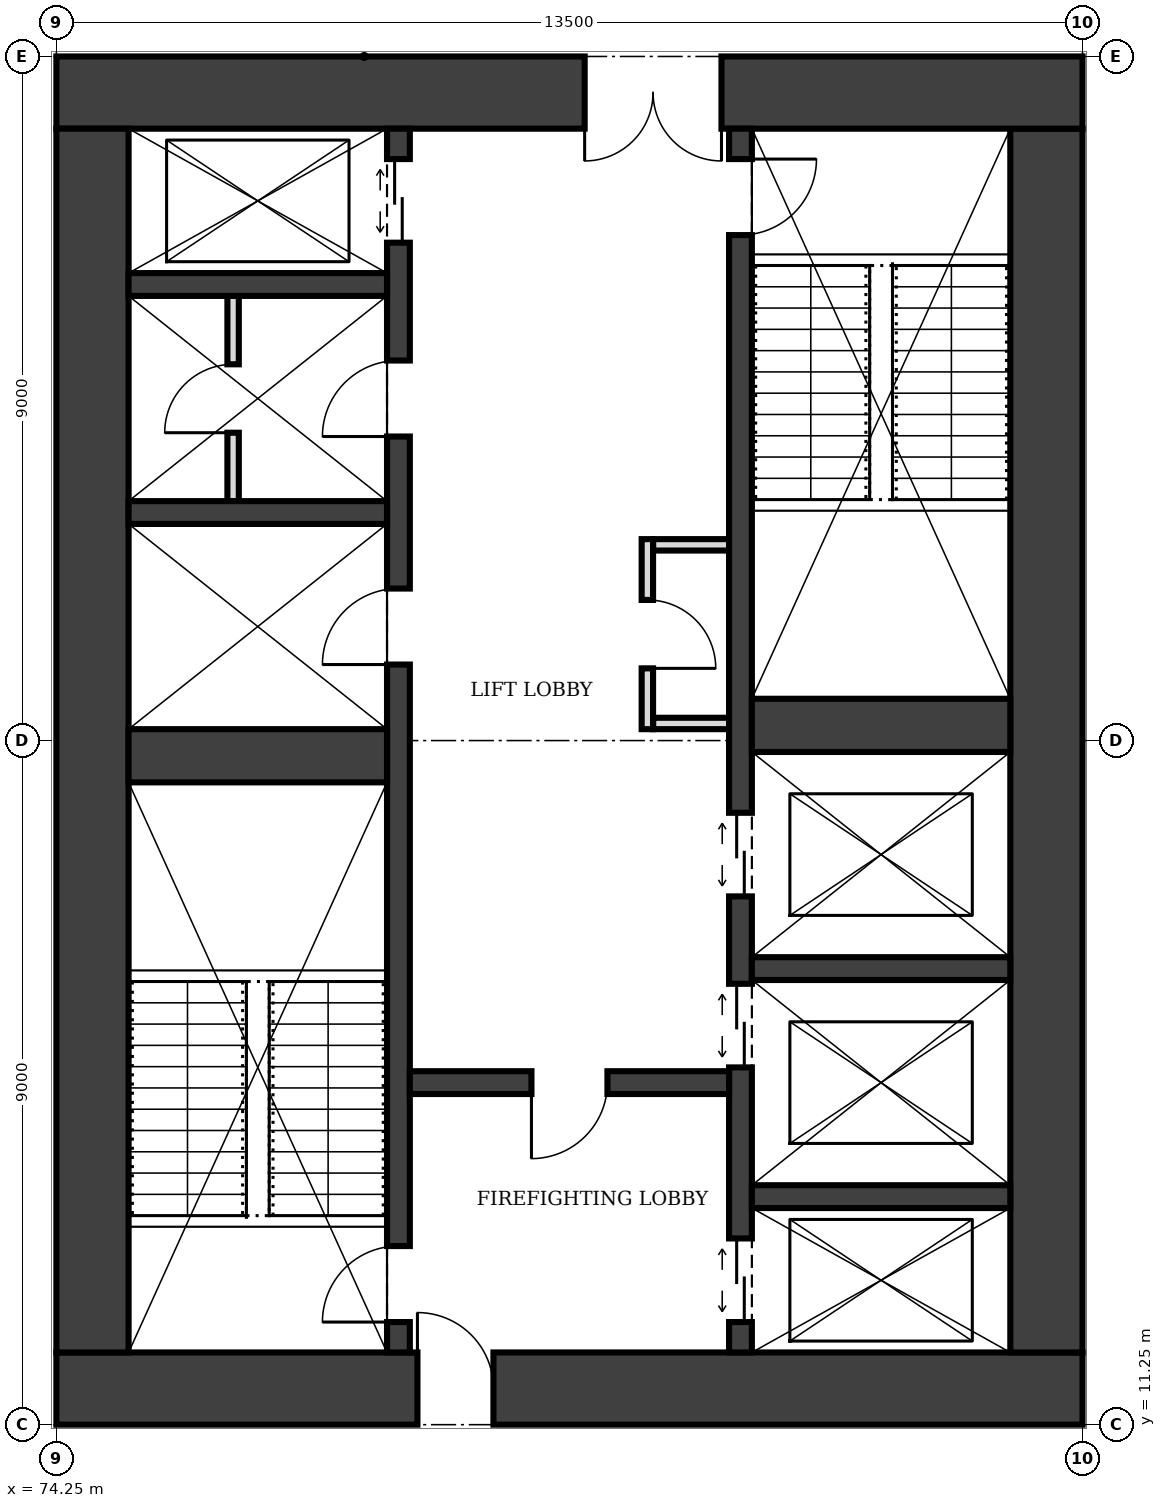
"""IFC4 building model, lengths in metres.
Left out: names, types, materials, properties, quantities, classifications, styles, units other than length and angle.
Written with IfcOpenShell. Run it as: python <this file> out.ifc"""

import sys

from ifc_helpers import new_model, si_unit, direction, frame, frame_2d, origin, place, context, subcontext, project, spatial, rectangle, extrude, element, fill, save


model = new_model("IFC4")
c1 = context("Model", 3, precision=1e-05, world=origin(), true_north=direction((0.0, 1.0)))
c2 = subcontext(c1, "Body", "Model", "MODEL_VIEW")
j1 = project(units=[si_unit("LENGTHUNIT", "METRE"), si_unit("PLANEANGLEUNIT", "RADIAN")], contexts=[c1])
p1 = place(None, origin())
s1 = spatial("IfcSite", under=j1, at=p1, CompositionType="ELEMENT")
p2 = place(p1, origin())
s2 = spatial("IfcBuilding", under=s1, at=p2, CompositionType="ELEMENT")
p3 = place(p2, frame((0.0, 0.0, 221.0)))
s3 = spatial("IfcBuildingStorey", under=s2, at=p3, CompositionType="ELEMENT", Elevation=221.0)
p4 = place(p3, frame((74.25, 11.725, 0.0), z_axis=(0.0, 0.0, 1.0), x_axis=(1.0, 0.0, 0.0)))
e1 = element("IfcWall", 1, at=p4, inside=s3, PredefinedType="SHEAR", context=c2, shape_type="SweptSolid", body=[
    extrude(rectangle(XDim=13.5, YDim=0.95, at=frame_2d((6.75, 0.0))), origin(), (0.0, 0.0, 1.0), 4.0),
])
p5 = place(p4, frame((4.75, 0.0, 0.0)))
e2 = element("IfcOpeningElement", 2, at=p5, cuts=e1, PredefinedType="OPENING", context=c2, shape_type="SweptSolid", body=[
    extrude(rectangle(XDim=1.0, YDim=2.1, at=frame_2d((0.5, 1.05))), frame((0.0, 0.485, 0.0), z_axis=(0.0, -1.0, 0.0), x_axis=(1.0, 0.0, 0.0)), (0.0, 0.0, 1.0), 0.97),
])
p6 = place(p3, frame((87.275, 12.2, 0.0), z_axis=(0.0, 0.0, 1.0), x_axis=(0.0, 1.0, 0.0)))
e3 = element("IfcWall", 3, at=p6, inside=s3, PredefinedType="SHEAR", context=c2, shape_type="SweptSolid", body=[
    extrude(rectangle(XDim=16.1, YDim=0.95, at=frame_2d((8.05, 0.0))), origin(), (0.0, 0.0, 1.0), 4.0),
])
p7 = place(p3, frame((87.75, 28.775, 0.0), z_axis=(0.0, 0.0, 1.0), x_axis=(-1.0, 0.0, 0.0)))
e4 = element("IfcWall", 4, at=p7, inside=s3, PredefinedType="SHEAR", context=c2, shape_type="SweptSolid", body=[
    extrude(rectangle(XDim=13.5, YDim=0.95, at=frame_2d((6.75, 0.0))), origin(), (0.0, 0.0, 1.0), 4.0),
])
p8 = place(p7, frame((4.75, 0.0, 0.0)))
e5 = element("IfcOpeningElement", 5, at=p8, cuts=e4, PredefinedType="OPENING", context=c2, shape_type="SweptSolid", body=[
    extrude(rectangle(XDim=1.8, YDim=2.1, at=frame_2d((0.9, 1.05))), frame((0.0, 0.485, 0.0), z_axis=(0.0, -1.0, 0.0), x_axis=(1.0, 0.0, 0.0)), (0.0, 0.0, 1.0), 0.97),
])
p9 = place(p3, frame((74.725, 28.3, 0.0), z_axis=(0.0, 0.0, 1.0), x_axis=(0.0, -1.0, 0.0)))
e6 = element("IfcWall", 6, at=p9, inside=s3, PredefinedType="SHEAR", context=c2, shape_type="SweptSolid", body=[
    extrude(rectangle(XDim=16.1, YDim=0.95, at=frame_2d((8.05, 0.0))), origin(), (0.0, 0.0, 1.0), 4.0),
])
p10 = place(p3, frame((78.75, 12.2, 0.0), z_axis=(0.0, 0.0, 1.0), x_axis=(0.0, 1.0, 0.0)))
e7 = element("IfcWall", 7, at=p10, inside=s3, PredefinedType="SHEAR", context=c2, shape_type="SweptSolid", body=[
    extrude(rectangle(XDim=16.1, YDim=0.3, at=frame_2d((8.05, 0.0))), origin(), (0.0, 0.0, 1.0), 4.0),
])
p11 = place(p10, frame((0.4, 0.0, 0.0)))
e8 = element("IfcOpeningElement", 8, at=p11, cuts=e7, PredefinedType="OPENING", context=c2, shape_type="SweptSolid", body=[
    extrude(rectangle(XDim=1.0, YDim=2.1, at=frame_2d((0.5, 1.05))), frame((0.0, 0.16, 0.0), z_axis=(0.0, -1.0, 0.0), x_axis=(1.0, 0.0, 0.0)), (0.0, 0.0, 1.0), 0.32),
])
p12 = place(p10, frame((14.6, 0.0, 0.0)))
e9 = element("IfcOpeningElement", 9, at=p12, cuts=e7, PredefinedType="OPENING", context=c2, shape_type="SweptSolid", body=[
    extrude(rectangle(XDim=1.1, YDim=2.1, at=frame_2d((0.55, 1.05))), frame((0.0, 0.16, 0.0), z_axis=(0.0, -1.0, 0.0), x_axis=(1.0, 0.0, 0.0)), (0.0, 0.0, 1.0), 0.32),
])
p13 = place(p10, frame((9.05, 0.0, 0.0)))
e10 = element("IfcOpeningElement", 10, at=p13, cuts=e7, PredefinedType="OPENING", context=c2, shape_type="SweptSolid", body=[
    extrude(rectangle(XDim=1.0, YDim=2.1, at=frame_2d((0.5, 1.05))), frame((0.0, 0.16, 0.0), z_axis=(0.0, -1.0, 0.0), x_axis=(1.0, 0.0, 0.0)), (0.0, 0.0, 1.0), 0.32),
])
p14 = place(p10, frame((12.05, 0.0, 0.0)))
e11 = element("IfcOpeningElement", 11, at=p14, cuts=e7, PredefinedType="OPENING", context=c2, shape_type="SweptSolid", body=[
    extrude(rectangle(XDim=1.0, YDim=2.1, at=frame_2d((0.5, 1.05))), frame((0.0, 0.16, 0.0), z_axis=(0.0, -1.0, 0.0), x_axis=(1.0, 0.0, 0.0)), (0.0, 0.0, 1.0), 0.32),
])
p15 = place(p3, frame((83.25, 12.2, 0.0), z_axis=(0.0, 0.0, 1.0), x_axis=(0.0, 1.0, 0.0)))
e12 = element("IfcWall", 12, at=p15, inside=s3, PredefinedType="SHEAR", context=c2, shape_type="SweptSolid", body=[
    extrude(rectangle(XDim=16.1, YDim=0.3, at=frame_2d((8.05, 0.0))), origin(), (0.0, 0.0, 1.0), 4.0),
])
p16 = place(p15, frame((14.7, 0.0, 0.0)))
e13 = element("IfcOpeningElement", 13, at=p16, cuts=e12, PredefinedType="OPENING", context=c2, shape_type="SweptSolid", body=[
    extrude(rectangle(XDim=1.0, YDim=2.1, at=frame_2d((0.5, 1.05))), frame((0.0, 0.16, 0.0), z_axis=(0.0, -1.0, 0.0), x_axis=(1.0, 0.0, 0.0)), (0.0, 0.0, 1.0), 0.32),
])
p17 = place(p15, frame((0.4, 0.0, 0.0)))
e14 = element("IfcOpeningElement", 14, at=p17, cuts=e12, PredefinedType="OPENING", context=c2, shape_type="SweptSolid", body=[
    extrude(rectangle(XDim=1.1, YDim=2.1, at=frame_2d((0.55, 1.05))), frame((0.0, 0.16, 0.0), z_axis=(0.0, -1.0, 0.0), x_axis=(1.0, 0.0, 0.0)), (0.0, 0.0, 1.0), 0.32),
])
p18 = place(p15, frame((3.75, 0.0, 0.0)))
e15 = element("IfcOpeningElement", 15, at=p18, cuts=e12, PredefinedType="OPENING", context=c2, shape_type="SweptSolid", body=[
    extrude(rectangle(XDim=1.1, YDim=2.1, at=frame_2d((0.55, 1.05))), frame((0.0, 0.16, 0.0), z_axis=(0.0, -1.0, 0.0), x_axis=(1.0, 0.0, 0.0)), (0.0, 0.0, 1.0), 0.32),
])
p19 = place(p15, frame((6.0, 0.0, 0.0)))
e16 = element("IfcOpeningElement", 16, at=p19, cuts=e12, PredefinedType="OPENING", context=c2, shape_type="SweptSolid", body=[
    extrude(rectangle(XDim=1.1, YDim=2.1, at=frame_2d((0.55, 1.05))), frame((0.0, 0.16, 0.0), z_axis=(0.0, -1.0, 0.0), x_axis=(1.0, 0.0, 0.0)), (0.0, 0.0, 1.0), 0.32),
])
p20 = place(p3, frame((75.2, 20.05, 0.0), z_axis=(0.0, 0.0, 1.0), x_axis=(1.0, 0.0, 0.0)))
e17 = element("IfcWall", 17, at=p20, inside=s3, PredefinedType="SHEAR", context=c2, shape_type="SweptSolid", body=[
    extrude(rectangle(XDim=3.4, YDim=0.7, at=frame_2d((1.7, 0.0))), origin(), (0.0, 0.0, 1.0), 4.0),
])
p21 = place(p3, frame((78.9, 15.75, 0.0), z_axis=(0.0, 0.0, 1.0), x_axis=(1.0, 0.0, 0.0)))
e18 = element("IfcWall", 18, at=p21, inside=s3, PredefinedType="SHEAR", context=c2, shape_type="SweptSolid", body=[
    extrude(rectangle(XDim=4.2, YDim=0.3, at=frame_2d((2.1, 0.0))), origin(), (0.0, 0.0, 1.0), 4.0),
])
p22 = place(p21, frame((1.6, 0.0, 0.0)))
e19 = element("IfcOpeningElement", 19, at=p22, cuts=e18, PredefinedType="OPENING", context=c2, shape_type="SweptSolid", body=[
    extrude(rectangle(XDim=1.0, YDim=2.1, at=frame_2d((0.5, 1.05))), frame((0.0, 0.16, 0.0), z_axis=(0.0, -1.0, 0.0), x_axis=(1.0, 0.0, 0.0)), (0.0, 0.0, 1.0), 0.32),
])
for number, where, z_axis, x_axis in (
    (20, (83.4, 14.25, 0.0), (0.0, 0.0, 1.0), (1.0, 0.0, 0.0)),
    (21, (83.4, 17.25, 0.0), (0.0, 0.0, 1.0), (1.0, 0.0, 0.0)),
):
    element("IfcWall", number, at=place(p3, frame(where, z_axis=z_axis, x_axis=x_axis)), inside=s3, PredefinedType="SHEAR", context=c2, shape_type="SweptSolid", body=[
        extrude(rectangle(XDim=3.4, YDim=0.3, at=frame_2d((1.7, 0.0))), origin(), (0.0, 0.0, 1.0), 4.0),
    ])
p23 = place(p3, frame((83.4, 20.45, 0.0), z_axis=(0.0, 0.0, 1.0), x_axis=(1.0, 0.0, 0.0)))
e22 = element("IfcWall", 22, at=p23, inside=s3, PredefinedType="SHEAR", context=c2, shape_type="SweptSolid", body=[
    extrude(rectangle(XDim=3.4, YDim=0.7, at=frame_2d((1.7, 0.0))), origin(), (0.0, 0.0, 1.0), 4.0),
])
for number, where, z_axis, x_axis in (
    (23, (75.2, 23.25, 0.0), (0.0, 0.0, 1.0), (1.0, 0.0, 0.0)),
    (24, (75.2, 26.25, 0.0), (0.0, 0.0, 1.0), (1.0, 0.0, 0.0)),
):
    element("IfcWall", number, at=place(p3, frame(where, z_axis=z_axis, x_axis=x_axis)), inside=s3, PredefinedType="SHEAR", context=c2, shape_type="SweptSolid", body=[
        extrude(rectangle(XDim=3.4, YDim=0.3, at=frame_2d((1.7, 0.0))), origin(), (0.0, 0.0, 1.0), 4.0),
    ])
p24 = place(p3, frame((82.025, 20.4, 0.0), z_axis=(0.0, 0.0, 1.0), x_axis=(0.0, 1.0, 0.0)))
e25 = element("IfcWall", 25, at=p24, inside=s3, PredefinedType="PARTITIONING", context=c2, shape_type="SweptSolid", body=[
    extrude(rectangle(XDim=2.5, YDim=0.15, at=frame_2d((1.25, 0.0))), origin(), (0.0, 0.0, 1.0), 3.75),
])
p25 = place(p24, frame((0.8, 0.0, 0.0)))
e26 = element("IfcOpeningElement", 26, at=p25, cuts=e25, PredefinedType="OPENING", context=c2, shape_type="SweptSolid", body=[
    extrude(rectangle(XDim=0.9, YDim=2.1, at=frame_2d((0.45, 1.05))), frame((0.0, 0.085, 0.0), z_axis=(0.0, -1.0, 0.0), x_axis=(1.0, 0.0, 0.0)), (0.0, 0.0, 1.0), 0.17),
])
for number, where, z_axis, x_axis in (
    (27, (82.1, 20.475, 0.0), (0.0, 0.0, 1.0), (1.0, 0.0, 0.0)),
    (28, (82.1, 22.825, 0.0), (0.0, 0.0, 1.0), (1.0, 0.0, 0.0)),
):
    element("IfcWall", number, at=place(p3, frame(where, z_axis=z_axis, x_axis=x_axis)), inside=s3, PredefinedType="PARTITIONING", context=c2, shape_type="SweptSolid", body=[
        extrude(rectangle(XDim=1.0, YDim=0.15, at=frame_2d((0.5, 0.0))), origin(), (0.0, 0.0, 1.0), 3.75),
    ])
p26 = place(p3, frame((76.575, 23.4, 0.0), z_axis=(0.0, 0.0, 1.0), x_axis=(0.0, 1.0, 0.0)))
e29 = element("IfcWall", 29, at=p26, inside=s3, PredefinedType="PARTITIONING", context=c2, shape_type="SweptSolid", body=[
    extrude(rectangle(XDim=2.7, YDim=0.15, at=frame_2d((1.35, 0.0))), origin(), (0.0, 0.0, 1.0), 3.75),
])
p27 = place(p26, frame((0.9, 0.0, 0.0)))
e30 = element("IfcOpeningElement", 30, at=p27, cuts=e29, PredefinedType="OPENING", context=c2, shape_type="SweptSolid", body=[
    extrude(rectangle(XDim=0.9, YDim=2.1, at=frame_2d((0.45, 1.05))), frame((0.0, 0.085, 0.0), z_axis=(0.0, -1.0, 0.0), x_axis=(1.0, 0.0, 0.0)), (0.0, 0.0, 1.0), 0.17),
])
p28 = place(p5, origin())
e31 = element("IfcDoor", 31, at=p28, inside=s3, OperationType="SINGLE_SWING_LEFT", PredefinedType="DOOR", context=c2, shape_type="SweptSolid", body=[
    extrude(rectangle(XDim=1.0, YDim=2.1, at=frame_2d((0.5, 1.05))), frame((0.0, 0.025, 0.0), z_axis=(0.0, -1.0, 0.0), x_axis=(1.0, 0.0, 0.0)), (0.0, 0.0, 1.0), 0.05),
])
fill(e2, e31)
p29 = place(p8, origin())
e32 = element("IfcDoor", 32, at=p29, inside=s3, OperationType="DOUBLE_DOOR_SINGLE_SWING", PredefinedType="DOOR", context=c2, shape_type="SweptSolid", body=[
    extrude(rectangle(XDim=1.8, YDim=2.1, at=frame_2d((0.9, 1.05))), frame((0.0, 0.025, 0.0), z_axis=(0.0, -1.0, 0.0), x_axis=(1.0, 0.0, 0.0)), (0.0, 0.0, 1.0), 0.05),
])
fill(e5, e32)
p30 = place(p22, frame((1.0, 0.0, 0.0), z_axis=(0.0, 0.0, 1.0), x_axis=(-1.0, 0.0, 0.0)))
e33 = element("IfcDoor", 33, at=p30, inside=s3, OperationType="SINGLE_SWING_RIGHT", PredefinedType="DOOR", context=c2, shape_type="SweptSolid", body=[
    extrude(rectangle(XDim=1.0, YDim=2.1, at=frame_2d((0.5, 1.05))), frame((0.0, 0.025, 0.0), z_axis=(0.0, -1.0, 0.0), x_axis=(1.0, 0.0, 0.0)), (0.0, 0.0, 1.0), 0.05),
])
fill(e19, e33)
p31 = place(p11, origin())
e34 = element("IfcDoor", 34, at=p31, inside=s3, OperationType="SINGLE_SWING_LEFT", PredefinedType="DOOR", context=c2, shape_type="SweptSolid", body=[
    extrude(rectangle(XDim=1.0, YDim=2.1, at=frame_2d((0.5, 1.05))), frame((0.0, 0.025, 0.0), z_axis=(0.0, -1.0, 0.0), x_axis=(1.0, 0.0, 0.0)), (0.0, 0.0, 1.0), 0.05),
])
fill(e8, e34)
p32 = place(p16, frame((1.0, 0.0, 0.0), z_axis=(0.0, 0.0, 1.0), x_axis=(-1.0, 0.0, 0.0)))
e35 = element("IfcDoor", 35, at=p32, inside=s3, OperationType="SINGLE_SWING_LEFT", PredefinedType="DOOR", context=c2, shape_type="SweptSolid", body=[
    extrude(rectangle(XDim=1.0, YDim=2.1, at=frame_2d((0.5, 1.05))), frame((0.0, 0.025, 0.0), z_axis=(0.0, -1.0, 0.0), x_axis=(1.0, 0.0, 0.0)), (0.0, 0.0, 1.0), 0.05),
])
fill(e13, e35)
p33 = place(p17, origin())
e36 = element("IfcDoor", 36, at=p33, inside=s3, OperationType="DOUBLE_DOOR_SLIDING", PredefinedType="DOOR", context=c2, shape_type="SweptSolid", body=[
    extrude(rectangle(XDim=1.1, YDim=2.1, at=frame_2d((0.55, 1.05))), frame((0.0, 0.025, 0.0), z_axis=(0.0, -1.0, 0.0), x_axis=(1.0, 0.0, 0.0)), (0.0, 0.0, 1.0), 0.05),
])
fill(e14, e36)
p34 = place(p12, origin())
e37 = element("IfcDoor", 37, at=p34, inside=s3, OperationType="DOUBLE_DOOR_SLIDING", PredefinedType="DOOR", context=c2, shape_type="SweptSolid", body=[
    extrude(rectangle(XDim=1.1, YDim=2.1, at=frame_2d((0.55, 1.05))), frame((0.0, 0.025, 0.0), z_axis=(0.0, -1.0, 0.0), x_axis=(1.0, 0.0, 0.0)), (0.0, 0.0, 1.0), 0.05),
])
fill(e9, e37)
p35 = place(p18, origin())
e38 = element("IfcDoor", 38, at=p35, inside=s3, OperationType="DOUBLE_DOOR_SLIDING", PredefinedType="DOOR", context=c2, shape_type="SweptSolid", body=[
    extrude(rectangle(XDim=1.1, YDim=2.1, at=frame_2d((0.55, 1.05))), frame((0.0, 0.025, 0.0), z_axis=(0.0, -1.0, 0.0), x_axis=(1.0, 0.0, 0.0)), (0.0, 0.0, 1.0), 0.05),
])
fill(e15, e38)
p36 = place(p19, origin())
e39 = element("IfcDoor", 39, at=p36, inside=s3, OperationType="DOUBLE_DOOR_SLIDING", PredefinedType="DOOR", context=c2, shape_type="SweptSolid", body=[
    extrude(rectangle(XDim=1.1, YDim=2.1, at=frame_2d((0.55, 1.05))), frame((0.0, 0.025, 0.0), z_axis=(0.0, -1.0, 0.0), x_axis=(1.0, 0.0, 0.0)), (0.0, 0.0, 1.0), 0.05),
])
fill(e16, e39)
p37 = place(p25, frame((0.9, 0.0, 0.0), z_axis=(0.0, 0.0, 1.0), x_axis=(-1.0, 0.0, 0.0)))
e40 = element("IfcDoor", 40, at=p37, inside=s3, OperationType="SINGLE_SWING_RIGHT", PredefinedType="DOOR", context=c2, shape_type="SweptSolid", body=[
    extrude(rectangle(XDim=0.9, YDim=2.1, at=frame_2d((0.45, 1.05))), frame((0.0, 0.025, 0.0), z_axis=(0.0, -1.0, 0.0), x_axis=(1.0, 0.0, 0.0)), (0.0, 0.0, 1.0), 0.05),
])
fill(e26, e40)
p38 = place(p13, origin())
e41 = element("IfcDoor", 41, at=p38, inside=s3, OperationType="SINGLE_SWING_LEFT", PredefinedType="DOOR", context=c2, shape_type="SweptSolid", body=[
    extrude(rectangle(XDim=1.0, YDim=2.1, at=frame_2d((0.5, 1.05))), frame((0.0, 0.025, 0.0), z_axis=(0.0, -1.0, 0.0), x_axis=(1.0, 0.0, 0.0)), (0.0, 0.0, 1.0), 0.05),
])
fill(e10, e41)
p39 = place(p14, origin())
e42 = element("IfcDoor", 42, at=p39, inside=s3, OperationType="SINGLE_SWING_LEFT", PredefinedType="DOOR", context=c2, shape_type="SweptSolid", body=[
    extrude(rectangle(XDim=1.0, YDim=2.1, at=frame_2d((0.5, 1.05))), frame((0.0, 0.025, 0.0), z_axis=(0.0, -1.0, 0.0), x_axis=(1.0, 0.0, 0.0)), (0.0, 0.0, 1.0), 0.05),
])
fill(e11, e42)
p40 = place(p27, origin())
e43 = element("IfcDoor", 43, at=p40, inside=s3, OperationType="SINGLE_SWING_LEFT", PredefinedType="DOOR", context=c2, shape_type="SweptSolid", body=[
    extrude(rectangle(XDim=0.9, YDim=2.1, at=frame_2d((0.45, 1.05))), frame((0.0, 0.025, 0.0), z_axis=(0.0, -1.0, 0.0), x_axis=(1.0, 0.0, 0.0)), (0.0, 0.0, 1.0), 0.05),
])
fill(e30, e43)
save(model, sys.argv[1])
